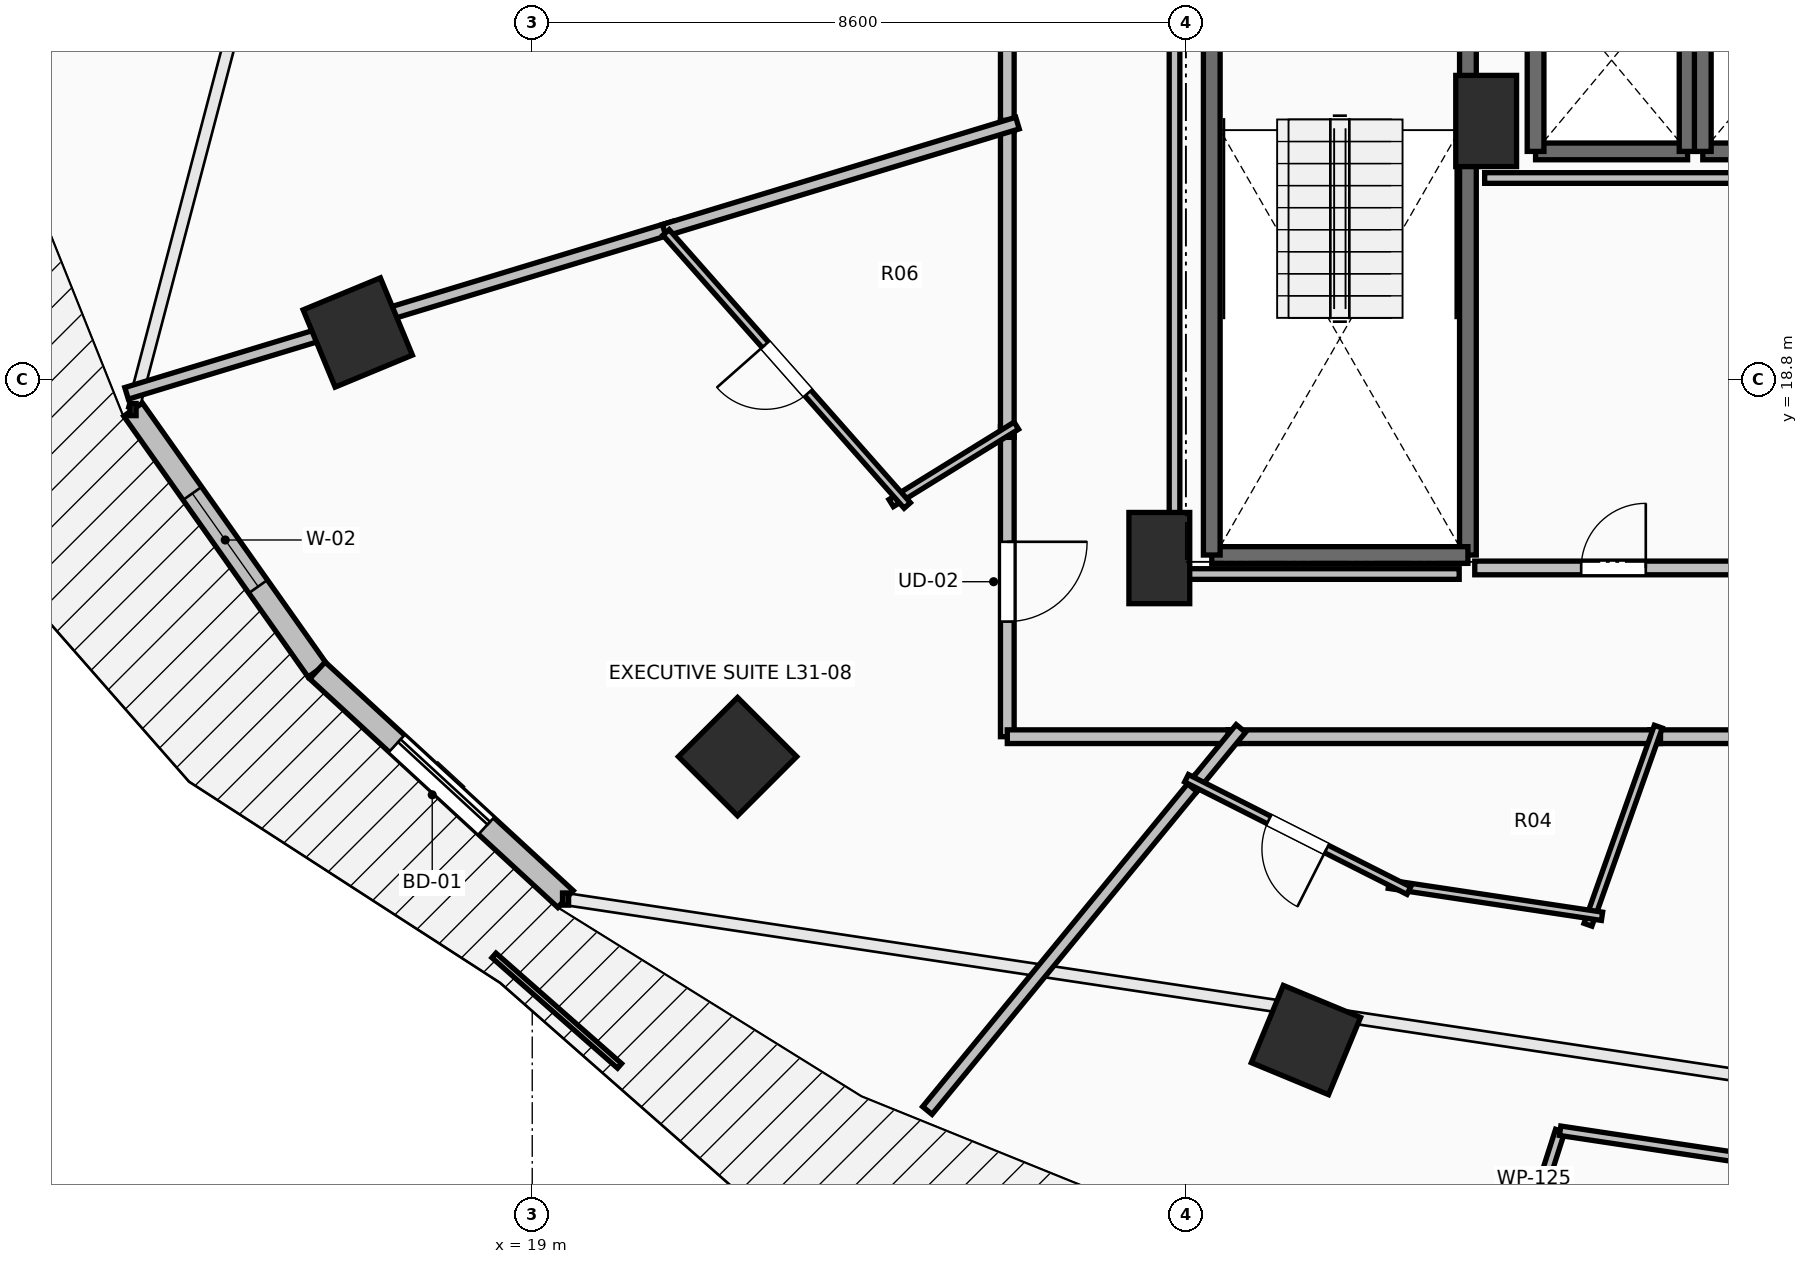
"""IFC4 building model, lengths in metres.
Left out: names, types, materials, properties, quantities, classifications, styles, units other than length and angle.
Written with IfcOpenShell. Run it as: python <this file> out.ifc"""

import sys

from ifc_helpers import new_model, si_unit, direction, frame, frame_2d, origin, origin_2d, place, context, subcontext, project, spatial, rectangle, extrude, element, fill, save


model = new_model("IFC4")
c1 = context("Model", 3, precision=1e-05, world=origin(), true_north=direction((0.0, 1.0)))
c2 = subcontext(c1, "Body", "Model", "MODEL_VIEW")
j1 = project(units=[si_unit("LENGTHUNIT", "METRE"), si_unit("PLANEANGLEUNIT", "RADIAN")], contexts=[c1])
p1 = place(None, origin())
s1 = spatial("IfcSite", under=j1, at=p1, CompositionType="ELEMENT")
p2 = place(p1, origin())
s2 = spatial("IfcBuilding", under=s1, at=p2, CompositionType="ELEMENT")
p3 = place(p2, frame((0.0, 0.0, 117.3)))
s3 = spatial("IfcBuildingStorey", under=s2, at=p3, CompositionType="ELEMENT", Elevation=117.3)
for number, where, z_axis, x_axis in (
    (1, (16.705, 19.418, 0.0), (0.0, 0.0, 1.0), (-0.924, -0.383, 0.0)),
    (2, (21.701, 13.838, 0.0), (0.0, 0.0, 1.0), (-0.707, -0.707, 0.0)),
    (3, (29.179, 10.109, 0.0), (0.0, 0.0, 1.0), (-0.383, -0.924, 0.0)),
):
    element("IfcColumn", number, at=place(p3, frame(where, z_axis=z_axis, x_axis=x_axis)), inside=s3, PredefinedType="COLUMN", context=c2, shape_type="SweptSolid", body=[
        extrude(rectangle(XDim=1.1, YDim=1.1, at=origin_2d()), origin(), (0.0, 0.0, 1.0), 3.5),
    ])
for number, where, z_axis, x_axis in (
    (4, (27.25, 16.45, 0.0), (0.0, 0.0, 1.0), (1.0, 0.0, 0.0)),
    (5, (31.55, 22.2, 0.0), (0.0, 0.0, 1.0), (1.0, 0.0, 0.0)),
):
    element("IfcColumn", number, at=place(p3, frame(where, z_axis=z_axis, x_axis=x_axis)), inside=s3, PredefinedType="PILASTER", context=c2, shape_type="SweptSolid", body=[
        extrude(rectangle(XDim=0.8, YDim=1.2, at=origin_2d()), origin(), (0.0, 0.0, 1.0), 3.5),
    ])
p4 = place(p3, frame((13.748, 18.404, 0.0), z_axis=(0.0, 0.0, 1.0), x_axis=(0.57716435238, -0.81662801222, 0.0)))
e6 = element("IfcWall", 6, at=p4, inside=s3, PredefinedType="STANDARD", context=c2, shape_type="SweptSolid", body=[
    extrude(rectangle(XDim=4.202, YDim=0.3, at=frame_2d((2.101, 0.0))), origin(), (0.0, 0.0, 1.0), 3.24),
])
p5 = place(p4, frame((1.351, 0.0, 0.85)))
e7 = element("IfcOpeningElement", 7, at=p5, cuts=e6, PredefinedType="OPENING", context=c2, shape_type="SweptSolid", body=[
    extrude(rectangle(XDim=1.5, YDim=2.19, at=frame_2d((0.75, 1.095))), frame((0.0, 0.165, 0.0), z_axis=(0.0, -1.0, 0.0), x_axis=(1.0, 0.0, 0.0)), (0.0, 0.0, 1.0), 0.33),
])
p6 = place(p3, frame((16.174, 14.972, 0.0), z_axis=(0.0, 0.0, 1.0), x_axis=(0.735416718093, -0.677615119924, 0.0)))
e8 = element("IfcWall", 8, at=p6, inside=s3, PredefinedType="STANDARD", context=c2, shape_type="SweptSolid", body=[
    extrude(rectangle(XDim=4.439, YDim=0.3, at=frame_2d((2.22, 0.0))), origin(), (0.0, 0.0, 1.0), 3.24),
])
p7 = place(p6, frame((1.419, 0.0, 0.0)))
e9 = element("IfcOpeningElement", 9, at=p7, cuts=e8, PredefinedType="OPENING", context=c2, shape_type="SweptSolid", body=[
    extrude(rectangle(XDim=1.6, YDim=2.3, at=frame_2d((0.8, 1.15))), frame((0.0, 0.165, 0.0), z_axis=(0.0, -1.0, 0.0), x_axis=(1.0, 0.0, 0.0)), (0.0, 0.0, 1.0), 0.33),
])
p8 = place(p3, frame((31.31, 23.91, 0.0), z_axis=(0.0, 0.0, 1.0), x_axis=(0.0, -1.0, 0.0)))
e10 = element("IfcWall", 10, at=p8, inside=s3, PredefinedType="SOLIDWALL", context=c2, shape_type="SweptSolid", body=[
    extrude(rectangle(XDim=7.42, YDim=0.22, at=frame_2d((3.71, 0.0))), origin(), (0.0, 0.0, 1.0), 3.24),
])
p9 = place(p3, frame((31.31, 16.49, 0.0), z_axis=(0.0, 0.0, 1.0), x_axis=(-1.0, 0.0, 0.0)))
e11 = element("IfcWall", 11, at=p9, inside=s3, PredefinedType="SOLIDWALL", context=c2, shape_type="SweptSolid", body=[
    extrude(rectangle(XDim=3.37, YDim=0.22, at=frame_2d((1.685, 0.0))), origin(), (0.0, 0.0, 1.0), 3.24),
])
p10 = place(p3, frame((27.94, 16.49, 0.0), z_axis=(0.0, 0.0, 1.0), x_axis=(0.0, 1.0, 0.0)))
e12 = element("IfcWall", 12, at=p10, inside=s3, PredefinedType="SOLIDWALL", context=c2, shape_type="SweptSolid", body=[
    extrude(rectangle(XDim=7.42, YDim=0.22, at=frame_2d((3.71, 0.0))), origin(), (0.0, 0.0, 1.0), 3.24),
])
p11 = place(p3, frame((32.2, 21.8, 0.0), z_axis=(0.0, 0.0, 1.0), x_axis=(1.0, 0.0, 0.0)))
e13 = element("IfcWall", 13, at=p11, inside=s3, PredefinedType="SOLIDWALL", context=c2, shape_type="SweptSolid", body=[
    extrude(rectangle(XDim=2.0, YDim=0.22, at=frame_2d((1.0, 0.0))), origin(), (0.0, 0.0, 1.0), 3.24),
])
for number, where, z_axis, x_axis in (
    (14, (34.2, 21.8, 0.0), (0.0, 0.0, 1.0), (0.0, 1.0, 0.0)),
    (15, (32.2, 24.2, 0.0), (0.0, 0.0, 1.0), (0.0, -1.0, 0.0)),
):
    element("IfcWall", number, at=place(p3, frame(where, z_axis=z_axis, x_axis=x_axis)), inside=s3, PredefinedType="SOLIDWALL", context=c2, shape_type="SweptSolid", body=[
        extrude(rectangle(XDim=2.4, YDim=0.22, at=frame_2d((1.2, 0.0))), origin(), (0.0, 0.0, 1.0), 3.24),
    ])
p12 = place(p3, frame((34.4, 21.8, 0.0), z_axis=(0.0, 0.0, 1.0), x_axis=(1.0, 0.0, 0.0)))
e16 = element("IfcWall", 16, at=p12, inside=s3, PredefinedType="SOLIDWALL", context=c2, shape_type="SweptSolid", body=[
    extrude(rectangle(XDim=2.0, YDim=0.22, at=frame_2d((1.0, 0.0))), origin(), (0.0, 0.0, 1.0), 3.24),
])
p13 = place(p3, frame((34.4, 24.2, 0.0), z_axis=(0.0, 0.0, 1.0), x_axis=(0.0, -1.0, 0.0)))
e17 = element("IfcWall", 17, at=p13, inside=s3, PredefinedType="SOLIDWALL", context=c2, shape_type="SweptSolid", body=[
    extrude(rectangle(XDim=2.4, YDim=0.22, at=frame_2d((1.2, 0.0))), origin(), (0.0, 0.0, 1.0), 3.24),
])
p14 = place(p3, frame((31.4, 16.32, 0.0), z_axis=(0.0, 0.0, 1.0), x_axis=(1.0, 0.0, 0.0)))
e18 = element("IfcWall", 18, at=p14, inside=s3, PredefinedType="PARTITIONING", context=c2, shape_type="SweptSolid", body=[
    extrude(rectangle(XDim=3.65, YDim=0.18, at=frame_2d((1.825, 0.0))), origin(), (0.0, 0.0, 1.0), 3.24),
])
p15 = place(p14, frame((1.4, 0.0, 0.0)))
e19 = element("IfcOpeningElement", 19, at=p15, cuts=e18, PredefinedType="OPENING", context=c2, shape_type="SweptSolid", body=[
    extrude(rectangle(XDim=0.85, YDim=2.1, at=frame_2d((0.425, 1.05))), frame((0.0, 0.105, 0.0), z_axis=(0.0, -1.0, 0.0), x_axis=(1.0, 0.0, 0.0)), (0.0, 0.0, 1.0), 0.21),
])
p16 = place(p3, frame((25.25, 26.511, 0.0), z_axis=(0.0, 0.0, 1.0), x_axis=(0.0, -1.0, 0.0)))
e20 = element("IfcWall", 20, at=p16, inside=s3, PredefinedType="PARTITIONING", context=c2, shape_type="SweptSolid", body=[
    extrude(rectangle(XDim=4.442, YDim=0.18, at=frame_2d((2.221, 0.0))), origin(), (0.0, 0.0, 1.0), 3.24),
])
p17 = place(p16, frame((1.696, 0.0, 0.0)))
e21 = element("IfcOpeningElement", 21, at=p17, cuts=e20, PredefinedType="OPENING", context=c2, shape_type="SweptSolid", body=[
    extrude(rectangle(XDim=1.05, YDim=2.2, at=frame_2d((0.525, 1.1))), frame((0.0, 0.105, 0.0), z_axis=(0.0, -1.0, 0.0), x_axis=(1.0, 0.0, 0.0)), (0.0, 0.0, 1.0), 0.21),
])
p18 = place(p3, frame((25.25, 18.178, 0.0), z_axis=(0.0, 0.0, 1.0), x_axis=(0.0, -1.0, 0.0)))
e22 = element("IfcWall", 22, at=p18, inside=s3, PredefinedType="PARTITIONING", context=c2, shape_type="SweptSolid", body=[
    extrude(rectangle(XDim=4.078, YDim=0.18, at=frame_2d((2.039, 0.0))), origin(), (0.0, 0.0, 1.0), 2.432),
])
p19 = place(p18, frame((1.514, 0.0, 0.0)))
e23 = element("IfcOpeningElement", 23, at=p19, cuts=e22, PredefinedType="OPENING", context=c2, shape_type="SweptSolid", body=[
    extrude(rectangle(XDim=1.05, YDim=2.2, at=frame_2d((0.525, 1.1))), frame((0.0, 0.105, 0.0), z_axis=(0.0, -1.0, 0.0), x_axis=(1.0, 0.0, 0.0)), (0.0, 0.0, 1.0), 0.21),
])
p20 = place(p3, frame((25.25, 14.1, 0.0), z_axis=(0.0, 0.0, 1.0), x_axis=(1.0, 0.0, 0.0)))
e24 = element("IfcWall", 24, at=p20, inside=s3, PredefinedType="PARTITIONING", context=c2, shape_type="SweptSolid", body=[
    extrude(rectangle(XDim=3.044, YDim=0.18, at=frame_2d((1.522, 0.0))), origin(), (0.0, 0.0, 1.0), 2.432),
])
p21 = place(p3, frame((25.25, 22.209, 0.0), z_axis=(0.0, 0.0, 1.0), x_axis=(0.0, -1.0, 0.0)))
e25 = element("IfcWall", 25, at=p21, inside=s3, PredefinedType="PARTITIONING", context=c2, shape_type="SweptSolid", body=[
    extrude(rectangle(XDim=4.171, YDim=0.18, at=frame_2d((2.085, 0.0))), origin(), (0.0, 0.0, 1.0), 3.24),
])
p22 = place(p3, frame((33.704, 14.1, 0.0), z_axis=(0.0, 0.0, 1.0), x_axis=(1.0, 0.0, 0.0)))
e26 = element("IfcWall", 26, at=p22, inside=s3, PredefinedType="PARTITIONING", context=c2, shape_type="SweptSolid", body=[
    extrude(rectangle(XDim=5.528, YDim=0.18, at=frame_2d((2.764, 0.0))), origin(), (0.0, 0.0, 1.0), 2.874),
])
p23 = place(p22, frame((2.239, 0.0, 0.0)))
e27 = element("IfcOpeningElement", 27, at=p23, cuts=e26, PredefinedType="OPENING", context=c2, shape_type="SweptSolid", body=[
    extrude(rectangle(XDim=1.05, YDim=2.2, at=frame_2d((0.525, 1.1))), frame((0.0, 0.105, 0.0), z_axis=(0.0, -1.0, 0.0), x_axis=(1.0, 0.0, 0.0)), (0.0, 0.0, 1.0), 0.21),
])
p24 = place(p3, frame((28.154, 14.1, 0.0), z_axis=(0.0, 0.0, 1.0), x_axis=(1.0, 0.0, 0.0)))
e28 = element("IfcWall", 28, at=p24, inside=s3, PredefinedType="PARTITIONING", context=c2, shape_type="SweptSolid", body=[
    extrude(rectangle(XDim=5.69, YDim=0.18, at=frame_2d((2.845, 0.0))), origin(), (0.0, 0.0, 1.0), 2.432),
])
p25 = place(p3, frame((13.663, 18.617, 0.0), z_axis=(0.0, 0.0, 1.0), x_axis=(0.956933827214, 0.290306132098, 0.0)))
e29 = element("IfcWall", 29, at=p25, inside=s3, PredefinedType="PARTITIONING", context=c2, shape_type="SweptSolid", body=[
    extrude(rectangle(XDim=7.53, YDim=0.16, at=frame_2d((3.765, 0.0))), origin(), (0.0, 0.0, 1.0), 2.929),
])
p26 = place(p3, frame((20.735, 20.762, 0.0), z_axis=(0.0, 0.0, 1.0), x_axis=(0.956916986017, 0.290361639807, 0.0)))
e30 = element("IfcWall", 30, at=p26, inside=s3, PredefinedType="PARTITIONING", context=c2, shape_type="SweptSolid", body=[
    extrude(rectangle(XDim=4.858, YDim=0.16, at=frame_2d((2.429, 0.0))), origin(), (0.0, 0.0, 1.0), 2.874),
])
p27 = place(p3, frame((25.369, 18.192, 0.0), z_axis=(0.0, 0.0, 1.0), x_axis=(-0.850587393094, -0.525833706328, 0.0)))
e31 = element("IfcWall", 31, at=p27, inside=s3, PredefinedType="PARTITIONING", context=c2, shape_type="SweptSolid", body=[
    extrude(rectangle(XDim=1.937, YDim=0.11, at=frame_2d((0.968, 0.0))), origin(), (0.0, 0.0, 1.0), 2.432),
])
p28 = place(p3, frame((23.934, 17.142, 0.0), z_axis=(0.0, 0.0, 1.0), x_axis=(-0.662103338525, 0.749412549344, 0.0)))
e32 = element("IfcWall", 32, at=p28, inside=s3, PredefinedType="PARTITIONING", context=c2, shape_type="SweptSolid", body=[
    extrude(rectangle(XDim=4.793, YDim=0.11, at=frame_2d((2.396, 0.0))), origin(), (0.0, 0.0, 1.0), 2.432),
])
p29 = place(p28, frame((1.971, 0.0, 0.0)))
e33 = element("IfcOpeningElement", 33, at=p29, cuts=e32, PredefinedType="OPENING", context=c2, shape_type="SweptSolid", body=[
    extrude(rectangle(XDim=0.85, YDim=2.1, at=frame_2d((0.425, 1.05))), frame((0.0, 0.07, 0.0), z_axis=(0.0, -1.0, 0.0), x_axis=(1.0, 0.0, 0.0)), (0.0, 0.0, 1.0), 0.14),
])
p30 = place(p3, frame((24.198, 9.182, 0.0), z_axis=(0.0, 0.0, 1.0), x_axis=(0.634365086516, 0.773033593713, 0.0)))
e34 = element("IfcWall", 34, at=p30, inside=s3, PredefinedType="PARTITIONING", context=c2, shape_type="SweptSolid", body=[
    extrude(rectangle(XDim=5.634, YDim=0.16, at=frame_2d((2.817, 0.0))), origin(), (0.0, 0.0, 1.0), 2.677),
])
p31 = place(p3, frame((27.683, 13.429, 0.0), z_axis=(0.0, 0.0, 1.0), x_axis=(0.634186727441, 0.77317992391, 0.0)))
e35 = element("IfcWall", 35, at=p31, inside=s3, PredefinedType="PARTITIONING", context=c2, shape_type="SweptSolid", body=[
    extrude(rectangle(XDim=1.008, YDim=0.16, at=frame_2d((0.504, 0.0))), origin(), (0.0, 0.0, 1.0), 2.432),
])
p32 = place(p3, frame((33.815, 14.232, 0.0), z_axis=(0.0, 0.0, 1.0), x_axis=(-0.334786713612, -0.942293933117, 0.0)))
e36 = element("IfcWall", 36, at=p32, inside=s3, PredefinedType="PARTITIONING", context=c2, shape_type="SweptSolid", body=[
    extrude(rectangle(XDim=2.765, YDim=0.11, at=frame_2d((1.383, 0.0))), origin(), (0.0, 0.0, 1.0), 2.874),
])
p33 = place(p3, frame((33.074, 11.737, 0.0), z_axis=(0.0, 0.0, 1.0), x_axis=(-0.988902866222, 0.148563525729, 0.0)))
e37 = element("IfcWall", 37, at=p33, inside=s3, PredefinedType="PARTITIONING", context=c2, shape_type="SweptSolid", body=[
    extrude(rectangle(XDim=2.836, YDim=0.11, at=frame_2d((1.418, 0.0))), origin(), (0.0, 0.0, 1.0), 3.24),
])
p34 = place(p3, frame((30.533, 12.075, 0.0), z_axis=(0.0, 0.0, 1.0), x_axis=(-0.892451870397, 0.451142614952, 0.0)))
e38 = element("IfcWall", 38, at=p34, inside=s3, PredefinedType="PARTITIONING", context=c2, shape_type="SweptSolid", body=[
    extrude(rectangle(XDim=3.277, YDim=0.11, at=frame_2d((1.639, 0.0))), origin(), (0.0, 0.0, 1.0), 2.432),
])
p35 = place(p34, frame((1.214, 0.0, 0.0)))
e39 = element("IfcOpeningElement", 39, at=p35, cuts=e38, PredefinedType="OPENING", context=c2, shape_type="SweptSolid", body=[
    extrude(rectangle(XDim=0.85, YDim=2.1, at=frame_2d((0.425, 1.05))), frame((0.0, 0.07, 0.0), z_axis=(0.0, -1.0, 0.0), x_axis=(1.0, 0.0, 0.0)), (0.0, 0.0, 1.0), 0.14),
])
p36 = place(p3, frame((31.836, 6.771, 0.0), z_axis=(0.0, 0.0, 1.0), x_axis=(0.305019563363, 0.952346085184, 0.0)))
e40 = element("IfcWall", 40, at=p36, inside=s3, PredefinedType="PARTITIONING", context=c2, shape_type="SweptSolid", body=[
    extrude(rectangle(XDim=2.252, YDim=0.125, at=frame_2d((1.126, 0.0))), origin(), (0.0, 0.0, 1.0), 3.24),
])
p37 = place(p3, frame((32.523, 8.916, 0.0), z_axis=(0.0, 0.0, 1.0), x_axis=(0.988872243588, -0.148767220385, 0.0)))
e41 = element("IfcWall", 41, at=p37, inside=s3, PredefinedType="PARTITIONING", context=c2, shape_type="SweptSolid", body=[
    extrude(rectangle(XDim=5.539, YDim=0.125, at=frame_2d((2.769, 0.0))), origin(), (0.0, 0.0, 1.0), 3.24),
])
p38 = place(p37, frame((2.319, 0.0, 0.0)))
e42 = element("IfcOpeningElement", 42, at=p38, cuts=e41, PredefinedType="OPENING", context=c2, shape_type="SweptSolid", body=[
    extrude(rectangle(XDim=0.9, YDim=2.1, at=frame_2d((0.45, 1.05))), frame((0.0, 0.077, 0.0), z_axis=(0.0, -1.0, 0.0), x_axis=(1.0, 0.0, 0.0)), (0.0, 0.0, 1.0), 0.155),
])
p39 = place(p3, frame((34.83, 21.45, 0.0), z_axis=(0.0, 0.0, 1.0), x_axis=(-1.0, 0.0, 0.0)))
e43 = element("IfcWall", 43, at=p39, inside=s3, PredefinedType="PARTITIONING", context=c2, shape_type="SweptSolid", body=[
    extrude(rectangle(XDim=3.3, YDim=0.14, at=frame_2d((1.65, 0.0))), origin(), (0.0, 0.0, 1.0), 3.24),
])
p40 = place(p3, frame((31.195, 16.24, 0.0), z_axis=(0.0, 0.0, 1.0), x_axis=(-1.0, 0.0, 0.0)))
e44 = element("IfcWall", 44, at=p40, inside=s3, PredefinedType="PARTITIONING", context=c2, shape_type="SweptSolid", body=[
    extrude(rectangle(XDim=3.745, YDim=0.14, at=frame_2d((1.873, 0.0))), origin(), (0.0, 0.0, 1.0), 2.432),
])
p41 = place(p3, frame((27.45, 16.24, 0.0), z_axis=(0.0, 0.0, 1.0), x_axis=(0.0, 1.0, 0.0)))
e45 = element("IfcWall", 45, at=p41, inside=s3, PredefinedType="PARTITIONING", context=c2, shape_type="SweptSolid", body=[
    extrude(rectangle(XDim=7.514, YDim=0.14, at=frame_2d((3.757, 0.0))), origin(), (0.0, 0.0, 1.0), 2.432),
])
p42 = place(p7, origin())
e46 = element("IfcDoor", 46, at=p42, inside=s3, OperationType="SLIDING_TO_LEFT", PredefinedType="DOOR", context=c2, shape_type="SweptSolid", body=[
    extrude(rectangle(XDim=1.6, YDim=2.3, at=frame_2d((0.8, 1.15))), frame((0.0, 0.025, 0.0), z_axis=(0.0, -1.0, 0.0), x_axis=(1.0, 0.0, 0.0)), (0.0, 0.0, 1.0), 0.05),
])
fill(e9, e46)
p43 = place(p5, origin())
e47 = element("IfcWindow", 47, at=p43, inside=s3, PartitioningType="SINGLE_PANEL", PredefinedType="WINDOW", context=c2, shape_type="SweptSolid", body=[
    extrude(rectangle(XDim=1.5, YDim=2.19, at=frame_2d((0.75, 1.095))), frame((0.0, 0.03, 0.0), z_axis=(0.0, -1.0, 0.0), x_axis=(1.0, 0.0, 0.0)), (0.0, 0.0, 1.0), 0.06),
])
fill(e7, e47)
p44 = place(p15, origin())
e48 = element("IfcDoor", 48, at=p44, inside=s3, OperationType="SINGLE_SWING_RIGHT", PredefinedType="DOOR", context=c2, shape_type="SweptSolid", body=[
    extrude(rectangle(XDim=0.85, YDim=2.1, at=frame_2d((0.425, 1.05))), frame((0.0, 0.025, 0.0), z_axis=(0.0, -1.0, 0.0), x_axis=(1.0, 0.0, 0.0)), (0.0, 0.0, 1.0), 0.05),
])
fill(e19, e48)
p45 = place(p19, origin())
e49 = element("IfcDoor", 49, at=p45, inside=s3, OperationType="SINGLE_SWING_LEFT", PredefinedType="DOOR", context=c2, shape_type="SweptSolid", body=[
    extrude(rectangle(XDim=1.05, YDim=2.2, at=frame_2d((0.525, 1.1))), frame((0.0, 0.025, 0.0), z_axis=(0.0, -1.0, 0.0), x_axis=(1.0, 0.0, 0.0)), (0.0, 0.0, 1.0), 0.05),
])
fill(e23, e49)
p46 = place(p29, origin())
e50 = element("IfcDoor", 50, at=p46, inside=s3, OperationType="SINGLE_SWING_RIGHT", PredefinedType="DOOR", context=c2, shape_type="SweptSolid", body=[
    extrude(rectangle(XDim=0.85, YDim=2.1, at=frame_2d((0.425, 1.05))), frame((0.0, 0.025, 0.0), z_axis=(0.0, -1.0, 0.0), x_axis=(1.0, 0.0, 0.0)), (0.0, 0.0, 1.0), 0.05),
])
fill(e33, e50)
p47 = place(p35, origin())
e51 = element("IfcDoor", 51, at=p47, inside=s3, OperationType="SINGLE_SWING_LEFT", PredefinedType="DOOR", context=c2, shape_type="SweptSolid", body=[
    extrude(rectangle(XDim=0.85, YDim=2.1, at=frame_2d((0.425, 1.05))), frame((0.0, 0.025, 0.0), z_axis=(0.0, -1.0, 0.0), x_axis=(1.0, 0.0, 0.0)), (0.0, 0.0, 1.0), 0.05),
])
fill(e39, e51)
save(model, sys.argv[1])
